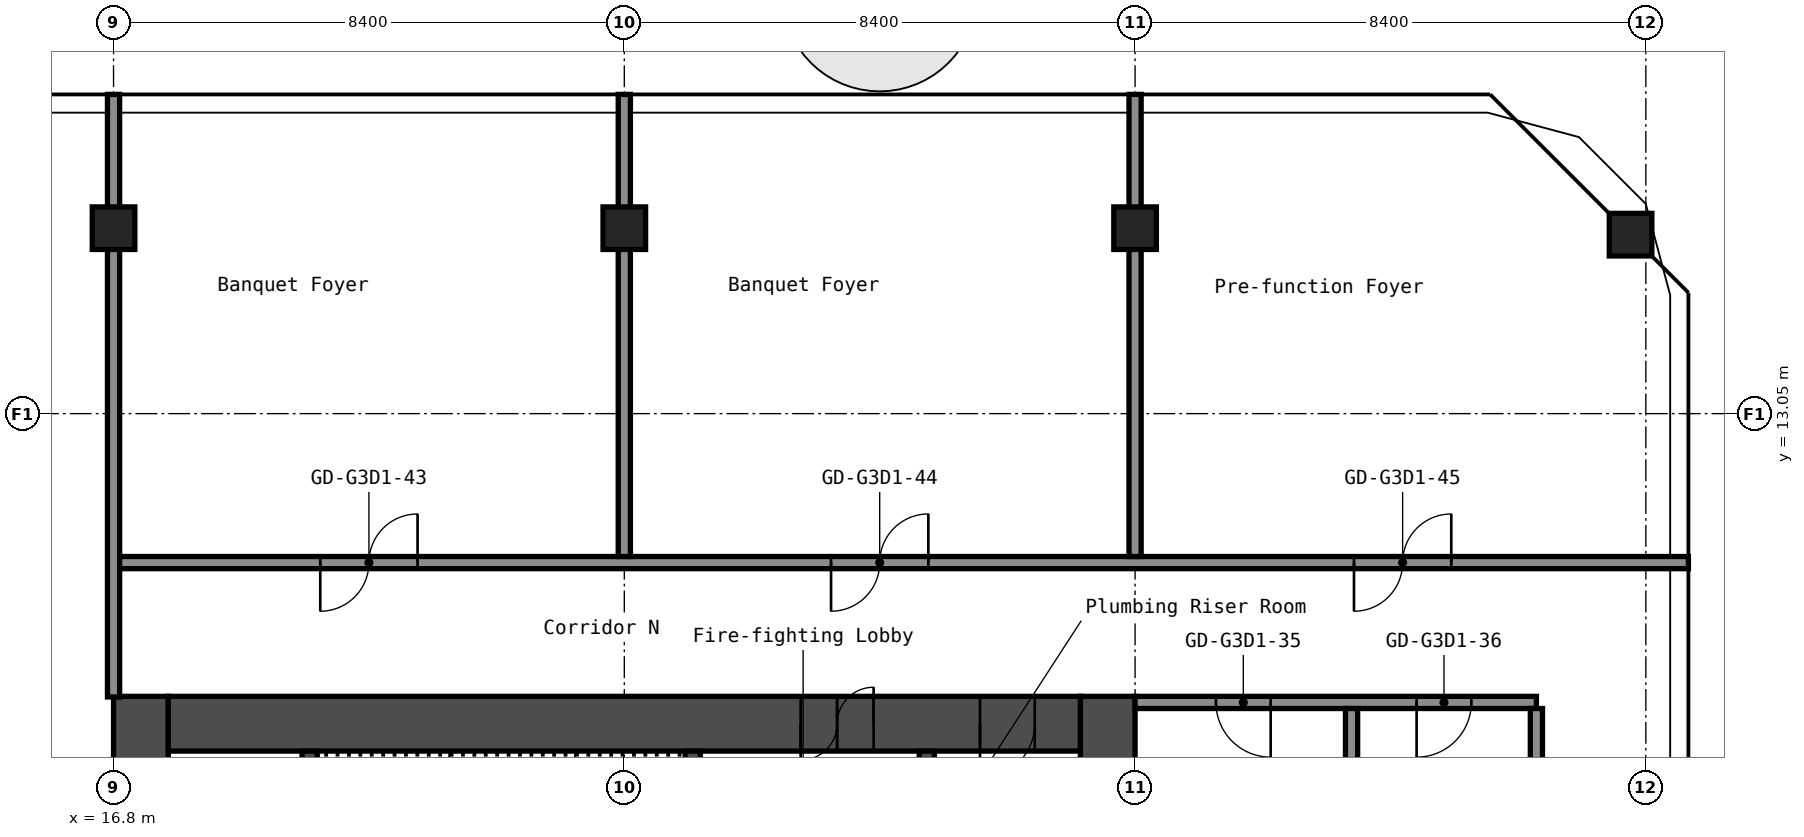
"""IFC4 building model, lengths in metres.
Left out: names, types, materials, properties, quantities, classifications, styles, units other than length and angle.
Written with IfcOpenShell. Run it as: python <this file> out.ifc"""

import sys

from ifc_helpers import new_model, si_unit, direction, frame, frame_2d, origin, origin_2d, place, context, subcontext, project, spatial, rectangle, hollow_rectangle, extrude, element, fill, save


model = new_model("IFC4")
c1 = context("Model", 3, precision=1e-05, world=origin(), true_north=direction((0.0, 1.0)))
c2 = subcontext(c1, "Body", "Model", "MODEL_VIEW")
j1 = project(units=[si_unit("LENGTHUNIT", "METRE"), si_unit("PLANEANGLEUNIT", "RADIAN")], contexts=[c1])
p1 = place(None, origin())
s1 = spatial("IfcSite", under=j1, at=p1, CompositionType="ELEMENT")
p2 = place(p1, origin())
s2 = spatial("IfcBuilding", under=s1, at=p2, CompositionType="ELEMENT")
p3 = place(p2, frame((0.0, 0.0, 156.6)))
s3 = spatial("IfcBuildingStorey", under=s2, at=p3, CompositionType="ELEMENT", Elevation=156.6)
for number, where, z_axis, x_axis in (
    (1, (16.8, 16.1, 0.0), (0.0, 0.0, 1.0), (1.0, 0.0, 0.0)),
    (2, (25.2, 16.1, 0.0), (0.0, 0.0, 1.0), (1.0, 0.0, 0.0)),
    (3, (33.6, 16.1, 0.0), (0.0, 0.0, 1.0), (1.0, 0.0, 0.0)),
    (4, (41.749, 15.994, 0.0), (0.0, 0.0, 1.0), (1.0, 0.0, 0.0)),
):
    element("IfcColumn", number, at=place(p3, frame(where, z_axis=z_axis, x_axis=x_axis)), inside=s3, PredefinedType="COLUMN", context=c2, shape_type="SweptSolid", body=[
        extrude(hollow_rectangle(XDim=0.7, YDim=0.7, WallThickness=0.028, at=origin_2d()), origin(), (0.0, 0.0, 1.0), 2.75),
    ])
p4 = place(p3, frame((17.25, -8.4, 0.0), z_axis=(0.0, 0.0, 1.0), x_axis=(0.0, 1.0, 0.0)))
e5 = element("IfcWall", 5, at=p4, inside=s3, PredefinedType="SHEAR", context=c2, shape_type="SweptSolid", body=[
    extrude(rectangle(XDim=16.8, YDim=0.9, at=frame_2d((8.4, 0.0))), origin(), (0.0, 0.0, 1.0), 2.75),
])
p5 = place(p4, frame((7.1, 0.0, 0.0)))
e6 = element("IfcOpeningElement", 6, at=p5, cuts=e5, PredefinedType="OPENING", context=c2, shape_type="SweptSolid", body=[
    extrude(rectangle(XDim=1.6, YDim=2.1, at=frame_2d((0.8, 1.05))), frame((0.0, 0.46, 0.0), z_axis=(0.0, -1.0, 0.0), x_axis=(1.0, 0.0, 0.0)), (0.0, 0.0, 1.0), 0.92),
])
p6 = place(p3, frame((33.15, -8.4, 0.0), z_axis=(0.0, 0.0, 1.0), x_axis=(0.0, 1.0, 0.0)))
e7 = element("IfcWall", 7, at=p6, inside=s3, PredefinedType="SHEAR", context=c2, shape_type="SweptSolid", body=[
    extrude(rectangle(XDim=16.8, YDim=0.9, at=frame_2d((8.4, 0.0))), origin(), (0.0, 0.0, 1.0), 2.75),
])
p7 = place(p3, frame((17.7, 7.95, 0.0), z_axis=(0.0, 0.0, 1.0), x_axis=(1.0, 0.0, 0.0)))
e8 = element("IfcWall", 8, at=p7, inside=s3, PredefinedType="SHEAR", context=c2, shape_type="SweptSolid", body=[
    extrude(rectangle(XDim=15.0, YDim=0.9, at=frame_2d((7.5, 0.0))), origin(), (0.0, 0.0, 1.0), 2.75),
])
p8 = place(p7, frame((10.4, 0.0, 0.0)))
e9 = element("IfcOpeningElement", 9, at=p8, cuts=e8, PredefinedType="OPENING", context=c2, shape_type="SweptSolid", body=[
    extrude(rectangle(XDim=1.2, YDim=2.1, at=frame_2d((0.6, 1.05))), frame((0.0, 0.46, 0.0), z_axis=(0.0, -1.0, 0.0), x_axis=(1.0, 0.0, 0.0)), (0.0, 0.0, 1.0), 0.92),
])
p9 = place(p7, frame((13.35, 0.0, 0.0)))
e10 = element("IfcOpeningElement", 10, at=p9, cuts=e8, PredefinedType="OPENING", context=c2, shape_type="SweptSolid", body=[
    extrude(rectangle(XDim=0.9, YDim=2.1, at=frame_2d((0.45, 1.05))), frame((0.0, 0.46, 0.0), z_axis=(0.0, -1.0, 0.0), x_axis=(1.0, 0.0, 0.0)), (0.0, 0.0, 1.0), 0.92),
])
p10 = place(p3, frame((20.025, 1.2, 0.0), z_axis=(0.0, 0.0, 1.0), x_axis=(0.0, 1.0, 0.0)))
e11 = element("IfcWall", 11, at=p10, inside=s3, PredefinedType="SHEAR", context=c2, shape_type="SweptSolid", body=[
    extrude(rectangle(XDim=6.3, YDim=0.25, at=frame_2d((3.15, 0.0))), origin(), (0.0, 0.0, 1.0), 2.75),
])
p11 = place(p3, frame((26.325, 3.75, 0.0), z_axis=(0.0, 0.0, 1.0), x_axis=(0.0, 1.0, 0.0)))
e12 = element("IfcWall", 12, at=p11, inside=s3, PredefinedType="SHEAR", context=c2, shape_type="SweptSolid", body=[
    extrude(rectangle(XDim=3.75, YDim=0.25, at=frame_2d((1.875, 0.0))), origin(), (0.0, 0.0, 1.0), 2.75),
])
p12 = place(p11, frame((1.25, 0.0, 0.0)))
e13 = element("IfcOpeningElement", 13, at=p12, cuts=e12, PredefinedType="OPENING", context=c2, shape_type="SweptSolid", body=[
    extrude(rectangle(XDim=1.2, YDim=2.1, at=frame_2d((0.6, 1.05))), frame((0.0, 0.135, 0.0), z_axis=(0.0, -1.0, 0.0), x_axis=(1.0, 0.0, 0.0)), (0.0, 0.0, 1.0), 0.27),
])
p13 = place(p3, frame((30.175, 1.45, 0.0), z_axis=(0.0, 0.0, 1.0), x_axis=(0.0, 1.0, 0.0)))
e14 = element("IfcWall", 14, at=p13, inside=s3, PredefinedType="SHEAR", context=c2, shape_type="SweptSolid", body=[
    extrude(rectangle(XDim=6.05, YDim=0.25, at=frame_2d((3.025, 0.0))), origin(), (0.0, 0.0, 1.0), 2.75),
])
p14 = place(p13, frame((2.625, 0.0, 0.0)))
e15 = element("IfcOpeningElement", 15, at=p14, cuts=e14, PredefinedType="OPENING", context=c2, shape_type="SweptSolid", body=[
    extrude(rectangle(XDim=1.1, YDim=2.1, at=frame_2d((0.55, 1.05))), frame((0.0, 0.135, 0.0), z_axis=(0.0, -1.0, 0.0), x_axis=(1.0, 0.0, 0.0)), (0.0, 0.0, 1.0), 0.27),
])
p15 = place(p3, frame((33.6, 8.3, 0.0), z_axis=(0.0, 0.0, 1.0), x_axis=(1.0, 0.0, 0.0)))
e16 = element("IfcWall", 16, at=p15, inside=s3, PredefinedType="PARTITIONING", context=c2, shape_type="SweptSolid", body=[
    extrude(rectangle(XDim=6.6, YDim=0.2, at=frame_2d((3.3, 0.0))), origin(), (0.0, 0.0, 1.0), 2.75),
])
p16 = place(p15, frame((1.33, 0.0, 0.0)))
e17 = element("IfcOpeningElement", 17, at=p16, cuts=e16, PredefinedType="OPENING", context=c2, shape_type="SweptSolid", body=[
    extrude(rectangle(XDim=0.9, YDim=2.1, at=frame_2d((0.45, 1.05))), frame((0.0, 0.11, 0.0), z_axis=(0.0, -1.0, 0.0), x_axis=(1.0, 0.0, 0.0)), (0.0, 0.0, 1.0), 0.22),
])
p17 = place(p15, frame((4.63, 0.0, 0.0)))
e18 = element("IfcOpeningElement", 18, at=p17, cuts=e16, PredefinedType="OPENING", context=c2, shape_type="SweptSolid", body=[
    extrude(rectangle(XDim=0.9, YDim=2.1, at=frame_2d((0.45, 1.05))), frame((0.0, 0.11, 0.0), z_axis=(0.0, -1.0, 0.0), x_axis=(1.0, 0.0, 0.0)), (0.0, 0.0, 1.0), 0.22),
])
p18 = place(p3, frame((16.8, 10.6, 0.0), z_axis=(0.0, 0.0, 1.0), x_axis=(1.0, 0.0, 0.0)))
e19 = element("IfcWall", 19, at=p18, inside=s3, PredefinedType="PARTITIONING", context=c2, shape_type="SweptSolid", body=[
    extrude(rectangle(XDim=25.9, YDim=0.2, at=frame_2d((12.95, 0.0))), origin(), (0.0, 0.0, 1.0), 2.75),
])
p19 = place(p18, frame((3.4, 0.0, 0.0)))
e20 = element("IfcOpeningElement", 20, at=p19, cuts=e19, PredefinedType="OPENING", context=c2, shape_type="SweptSolid", body=[
    extrude(rectangle(XDim=1.6, YDim=2.1, at=frame_2d((0.8, 1.05))), frame((0.0, 0.11, 0.0), z_axis=(0.0, -1.0, 0.0), x_axis=(1.0, 0.0, 0.0)), (0.0, 0.0, 1.0), 0.22),
])
p20 = place(p18, frame((11.8, 0.0, 0.0)))
e21 = element("IfcOpeningElement", 21, at=p20, cuts=e19, PredefinedType="OPENING", context=c2, shape_type="SweptSolid", body=[
    extrude(rectangle(XDim=1.6, YDim=2.1, at=frame_2d((0.8, 1.05))), frame((0.0, 0.11, 0.0), z_axis=(0.0, -1.0, 0.0), x_axis=(1.0, 0.0, 0.0)), (0.0, 0.0, 1.0), 0.22),
])
p21 = place(p18, frame((20.4, 0.0, 0.0)))
e22 = element("IfcOpeningElement", 22, at=p21, cuts=e19, PredefinedType="OPENING", context=c2, shape_type="SweptSolid", body=[
    extrude(rectangle(XDim=1.6, YDim=2.1, at=frame_2d((0.8, 1.05))), frame((0.0, 0.11, 0.0), z_axis=(0.0, -1.0, 0.0), x_axis=(1.0, 0.0, 0.0)), (0.0, 0.0, 1.0), 0.22),
])
p22 = place(p3, frame((16.8, 8.39, 0.0), z_axis=(0.0, 0.0, 1.0), x_axis=(0.0, 1.0, 0.0)))
e23 = element("IfcWall", 23, at=p22, inside=s3, PredefinedType="PARTITIONING", context=c2, shape_type="SweptSolid", body=[
    extrude(rectangle(XDim=9.91, YDim=0.2, at=frame_2d((4.955, 0.0))), origin(), (0.0, 0.0, 1.0), 2.75),
])
for number, where, z_axis, x_axis in (
    (24, (25.2, 10.7, 0.0), (0.0, 0.0, 1.0), (0.0, 1.0, 0.0)),
    (25, (33.6, 10.7, 0.0), (0.0, 0.0, 1.0), (0.0, 1.0, 0.0)),
):
    element("IfcWall", number, at=place(p3, frame(where, z_axis=z_axis, x_axis=x_axis)), inside=s3, PredefinedType="PARTITIONING", context=c2, shape_type="SweptSolid", body=[
        extrude(rectangle(XDim=7.6, YDim=0.2, at=frame_2d((3.8, 0.0))), origin(), (0.0, 0.0, 1.0), 2.75),
    ])
p23 = place(p3, frame((37.16, 0.0, 0.0), z_axis=(0.0, 0.0, 1.0), x_axis=(0.0, 1.0, 0.0)))
e26 = element("IfcWall", 26, at=p23, inside=s3, PredefinedType="PARTITIONING", context=c2, shape_type="SweptSolid", body=[
    extrude(rectangle(XDim=8.2, YDim=0.2, at=frame_2d((4.1, 0.0))), origin(), (0.0, 0.0, 1.0), 2.75),
])
p24 = place(p3, frame((40.2, -8.2, 0.0), z_axis=(0.0, 0.0, 1.0), x_axis=(0.0, 1.0, 0.0)))
e27 = element("IfcWall", 27, at=p24, inside=s3, PredefinedType="PARTITIONING", context=c2, shape_type="SweptSolid", body=[
    extrude(rectangle(XDim=16.4, YDim=0.2, at=frame_2d((8.2, 0.0))), origin(), (0.0, 0.0, 1.0), 2.75),
])
p25 = place(p8, origin())
e28 = element("IfcDoor", 28, at=p25, inside=s3, OperationType="DOUBLE_DOOR_SINGLE_SWING", PredefinedType="DOOR", context=c2, shape_type="SweptSolid", body=[
    extrude(rectangle(XDim=1.2, YDim=2.1, at=frame_2d((0.6, 1.05))), frame((0.0, 0.025, 0.0), z_axis=(0.0, -1.0, 0.0), x_axis=(1.0, 0.0, 0.0)), (0.0, 0.0, 1.0), 0.05),
])
fill(e9, e28)
p26 = place(p9, origin())
e29 = element("IfcDoor", 29, at=p26, inside=s3, OperationType="SINGLE_SWING_LEFT", PredefinedType="DOOR", context=c2, shape_type="SweptSolid", body=[
    extrude(rectangle(XDim=0.9, YDim=2.1, at=frame_2d((0.45, 1.05))), frame((0.0, 0.025, 0.0), z_axis=(0.0, -1.0, 0.0), x_axis=(1.0, 0.0, 0.0)), (0.0, 0.0, 1.0), 0.05),
])
fill(e10, e29)
p27 = place(p16, origin())
e30 = element("IfcDoor", 30, at=p27, inside=s3, OperationType="SINGLE_SWING_RIGHT", PredefinedType="DOOR", context=c2, shape_type="SweptSolid", body=[
    extrude(rectangle(XDim=0.9, YDim=2.1, at=frame_2d((0.45, 1.05))), frame((0.0, 0.025, 0.0), z_axis=(0.0, -1.0, 0.0), x_axis=(1.0, 0.0, 0.0)), (0.0, 0.0, 1.0), 0.05),
])
fill(e17, e30)
p28 = place(p17, origin())
e31 = element("IfcDoor", 31, at=p28, inside=s3, OperationType="SINGLE_SWING_LEFT", PredefinedType="DOOR", context=c2, shape_type="SweptSolid", body=[
    extrude(rectangle(XDim=0.9, YDim=2.1, at=frame_2d((0.45, 1.05))), frame((0.0, 0.025, 0.0), z_axis=(0.0, -1.0, 0.0), x_axis=(1.0, 0.0, 0.0)), (0.0, 0.0, 1.0), 0.05),
])
fill(e18, e31)
p29 = place(p19, origin())
e32 = element("IfcDoor", 32, at=p29, inside=s3, OperationType="DOUBLE_DOOR_SINGLE_SWING", PredefinedType="DOOR", context=c2, shape_type="SweptSolid", body=[
    extrude(rectangle(XDim=1.6, YDim=2.1, at=frame_2d((0.8, 1.05))), frame((0.0, 0.025, 0.0), z_axis=(0.0, -1.0, 0.0), x_axis=(1.0, 0.0, 0.0)), (0.0, 0.0, 1.0), 0.05),
])
fill(e20, e32)
p30 = place(p20, origin())
e33 = element("IfcDoor", 33, at=p30, inside=s3, OperationType="DOUBLE_DOOR_SINGLE_SWING", PredefinedType="DOOR", context=c2, shape_type="SweptSolid", body=[
    extrude(rectangle(XDim=1.6, YDim=2.1, at=frame_2d((0.8, 1.05))), frame((0.0, 0.025, 0.0), z_axis=(0.0, -1.0, 0.0), x_axis=(1.0, 0.0, 0.0)), (0.0, 0.0, 1.0), 0.05),
])
fill(e21, e33)
p31 = place(p21, origin())
e34 = element("IfcDoor", 34, at=p31, inside=s3, OperationType="DOUBLE_DOOR_SINGLE_SWING", PredefinedType="DOOR", context=c2, shape_type="SweptSolid", body=[
    extrude(rectangle(XDim=1.6, YDim=2.1, at=frame_2d((0.8, 1.05))), frame((0.0, 0.025, 0.0), z_axis=(0.0, -1.0, 0.0), x_axis=(1.0, 0.0, 0.0)), (0.0, 0.0, 1.0), 0.05),
])
fill(e22, e34)
save(model, sys.argv[1])
